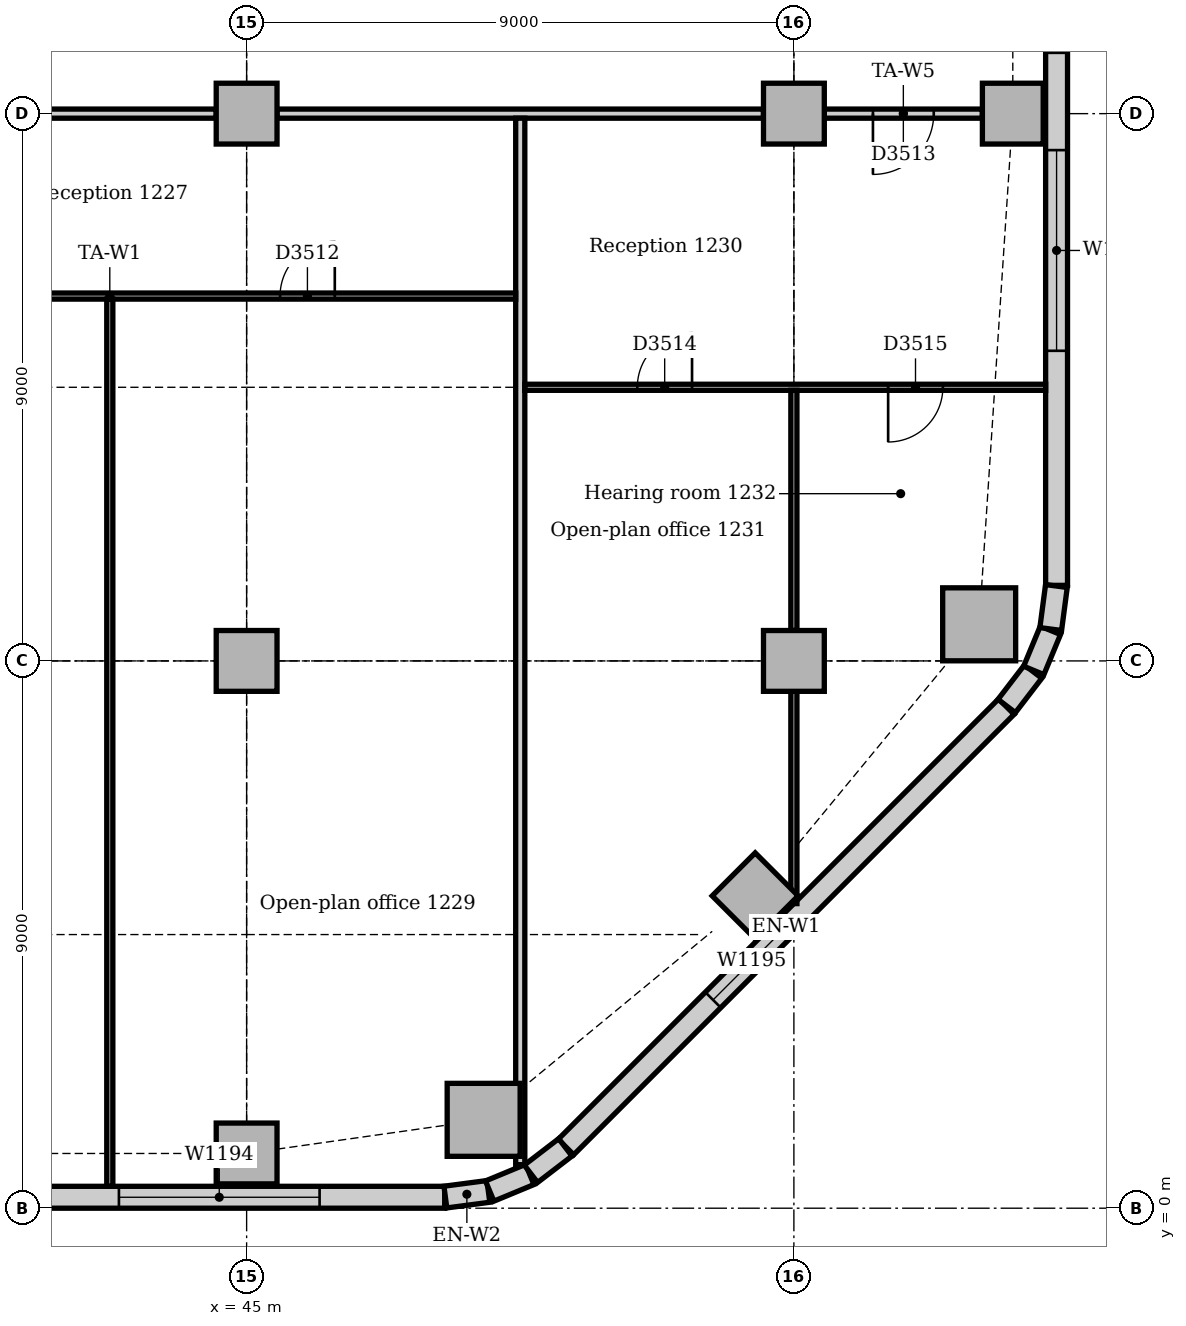
"""IFC4 building model, lengths in metres.
Left out: names, types, materials, properties, quantities, classifications, styles, units other than length and angle.
Written with IfcOpenShell. Run it as: python <this file> out.ifc"""

import sys

from ifc_helpers import new_model, si_unit, direction, frame, frame_2d, origin, origin_2d, place, context, subcontext, project, spatial, rectangle, extrude, element, fill, save


model = new_model("IFC4")
c1 = context("Model", 3, precision=1e-05, world=origin(), true_north=direction((0.0, 1.0)))
c2 = subcontext(c1, "Body", "Model", "MODEL_VIEW")
j1 = project(units=[si_unit("LENGTHUNIT", "METRE"), si_unit("PLANEANGLEUNIT", "RADIAN")], contexts=[c1])
p1 = place(None, origin())
s1 = spatial("IfcSite", under=j1, at=p1, CompositionType="ELEMENT")
p2 = place(p1, origin())
s2 = spatial("IfcBuilding", under=s1, at=p2, CompositionType="ELEMENT")
p3 = place(p2, frame((0.0, 0.0, 55.0)))
s3 = spatial("IfcBuildingStorey", under=s2, at=p3, CompositionType="ELEMENT", Elevation=55.0)
for number, where, z_axis, x_axis in (
    (1, (48.898, 1.453, 0.0), (0.0, 0.0, 1.0), (1.0, 0.0, 0.0)),
    (2, (57.047, 9.602, 0.0), (0.0, 0.0, 1.0), (1.0, 0.0, 0.0)),
):
    element("IfcColumn", number, at=place(p3, frame(where, z_axis=z_axis, x_axis=x_axis)), inside=s3, PredefinedType="COLUMN", context=c2, shape_type="SweptSolid", body=[
        extrude(rectangle(XDim=1.2, YDim=1.2, at=origin_2d()), origin(), (0.0, 0.0, 1.0), 3.85),
    ])
for number, where, z_axis, x_axis in (
    (3, (45.0, 0.9, 0.0), (0.0, 0.0, 1.0), (1.0, 0.0, 0.0)),
    (4, (53.364, 5.136, 0.0), (0.0, 0.0, 1.0), (0.707, 0.707, 0.0)),
    (5, (57.6, 18.0, 0.0), (0.0, 0.0, 1.0), (1.0, 0.0, 0.0)),
    (6, (45.0, 9.0, 0.0), (0.0, 0.0, 1.0), (1.0, 0.0, 0.0)),
    (7, (45.0, 18.0, 0.0), (0.0, 0.0, 1.0), (1.0, 0.0, 0.0)),
    (8, (54.0, 9.0, 0.0), (0.0, 0.0, 1.0), (1.0, 0.0, 0.0)),
    (9, (54.0, 18.0, 0.0), (0.0, 0.0, 1.0), (1.0, 0.0, 0.0)),
):
    element("IfcColumn", number, at=place(p3, frame(where, z_axis=z_axis, x_axis=x_axis)), inside=s3, PredefinedType="COLUMN", context=c2, shape_type="SweptSolid", body=[
        extrude(rectangle(XDim=1.0, YDim=1.0, at=origin_2d()), origin(), (0.0, 0.0, 1.0), 3.85),
    ])
p4 = place(p3, frame((4.243, 0.18, 0.0), z_axis=(0.0, 0.0, 1.0), x_axis=(1.0, 0.0, 0.0)))
e10 = element("IfcWall", 10, at=p4, inside=s3, PredefinedType="STANDARD", context=c2, shape_type="SweptSolid", body=[
    extrude(rectangle(XDim=44.015, YDim=0.36, at=frame_2d((22.007, 0.0))), origin(), (0.0, 0.0, 1.0), 3.85),
])
p5 = place(p4, frame((2.707, 0.0, 0.9)))
e11 = element("IfcOpeningElement", 11, at=p5, cuts=e10, PredefinedType="OPENING", context=c2, shape_type="SweptSolid", body=[
    extrude(rectangle(XDim=3.3, YDim=1.6, at=frame_2d((1.65, 0.8))), frame((0.0, 0.19, 0.0), z_axis=(0.0, -1.0, 0.0), x_axis=(1.0, 0.0, 0.0)), (0.0, 0.0, 1.0), 0.38),
])
p6 = place(p4, frame((7.257, 0.0, 0.9)))
e12 = element("IfcOpeningElement", 12, at=p6, cuts=e10, PredefinedType="OPENING", context=c2, shape_type="SweptSolid", body=[
    extrude(rectangle(XDim=1.8, YDim=1.6, at=frame_2d((0.9, 0.8))), frame((0.0, 0.19, 0.0), z_axis=(0.0, -1.0, 0.0), x_axis=(1.0, 0.0, 0.0)), (0.0, 0.0, 1.0), 0.38),
])
p7 = place(p4, frame((11.357, 0.0, 0.9)))
e13 = element("IfcOpeningElement", 13, at=p7, cuts=e10, PredefinedType="OPENING", context=c2, shape_type="SweptSolid", body=[
    extrude(rectangle(XDim=3.3, YDim=1.6, at=frame_2d((1.65, 0.8))), frame((0.0, 0.19, 0.0), z_axis=(0.0, -1.0, 0.0), x_axis=(1.0, 0.0, 0.0)), (0.0, 0.0, 1.0), 0.38),
])
p8 = place(p4, frame((15.857, 0.0, 0.9)))
e14 = element("IfcOpeningElement", 14, at=p8, cuts=e10, PredefinedType="OPENING", context=c2, shape_type="SweptSolid", body=[
    extrude(rectangle(XDim=3.3, YDim=1.6, at=frame_2d((1.65, 0.8))), frame((0.0, 0.19, 0.0), z_axis=(0.0, -1.0, 0.0), x_axis=(1.0, 0.0, 0.0)), (0.0, 0.0, 1.0), 0.38),
])
p9 = place(p4, frame((20.357, 0.0, 0.9)))
e15 = element("IfcOpeningElement", 15, at=p9, cuts=e10, PredefinedType="OPENING", context=c2, shape_type="SweptSolid", body=[
    extrude(rectangle(XDim=3.3, YDim=1.6, at=frame_2d((1.65, 0.8))), frame((0.0, 0.19, 0.0), z_axis=(0.0, -1.0, 0.0), x_axis=(1.0, 0.0, 0.0)), (0.0, 0.0, 1.0), 0.38),
])
p10 = place(p4, frame((25.307, 0.0, 0.9)))
e16 = element("IfcOpeningElement", 16, at=p10, cuts=e10, PredefinedType="OPENING", context=c2, shape_type="SweptSolid", body=[
    extrude(rectangle(XDim=1.8, YDim=1.6, at=frame_2d((0.9, 0.8))), frame((0.0, 0.19, 0.0), z_axis=(0.0, -1.0, 0.0), x_axis=(1.0, 0.0, 0.0)), (0.0, 0.0, 1.0), 0.38),
])
p11 = place(p4, frame((29.357, 0.0, 0.9)))
e17 = element("IfcOpeningElement", 17, at=p11, cuts=e10, PredefinedType="OPENING", context=c2, shape_type="SweptSolid", body=[
    extrude(rectangle(XDim=3.3, YDim=1.6, at=frame_2d((1.65, 0.8))), frame((0.0, 0.19, 0.0), z_axis=(0.0, -1.0, 0.0), x_axis=(1.0, 0.0, 0.0)), (0.0, 0.0, 1.0), 0.38),
])
p12 = place(p4, frame((33.857, 0.0, 0.9)))
e18 = element("IfcOpeningElement", 18, at=p12, cuts=e10, PredefinedType="OPENING", context=c2, shape_type="SweptSolid", body=[
    extrude(rectangle(XDim=3.3, YDim=1.6, at=frame_2d((1.65, 0.8))), frame((0.0, 0.19, 0.0), z_axis=(0.0, -1.0, 0.0), x_axis=(1.0, 0.0, 0.0)), (0.0, 0.0, 1.0), 0.38),
])
p13 = place(p4, frame((38.657, 0.0, 0.9)))
e19 = element("IfcOpeningElement", 19, at=p13, cuts=e10, PredefinedType="OPENING", context=c2, shape_type="SweptSolid", body=[
    extrude(rectangle(XDim=3.3, YDim=1.6, at=frame_2d((1.65, 0.8))), frame((0.0, 0.19, 0.0), z_axis=(0.0, -1.0, 0.0), x_axis=(1.0, 0.0, 0.0)), (0.0, 0.0, 1.0), 0.38),
])
p14 = place(p3, frame((50.251, 1.006, 0.0), z_axis=(0.0, 0.0, 1.0), x_axis=(0.707106781187, 0.707106781187, 0.0)))
e20 = element("IfcWall", 20, at=p14, inside=s3, PredefinedType="STANDARD", context=c2, shape_type="SweptSolid", body=[
    extrude(rectangle(XDim=10.243, YDim=0.36, at=frame_2d((5.121, 0.0))), origin(), (0.0, 0.0, 1.0), 3.85),
])
p15 = place(p14, frame((3.421, 0.0, 0.9)))
e21 = element("IfcOpeningElement", 21, at=p15, cuts=e20, PredefinedType="OPENING", context=c2, shape_type="SweptSolid", body=[
    extrude(rectangle(XDim=1.8, YDim=1.6, at=frame_2d((0.9, 0.8))), frame((0.0, 0.19, 0.0), z_axis=(0.0, -1.0, 0.0), x_axis=(1.0, 0.0, 0.0)), (0.0, 0.0, 1.0), 0.38),
])
p16 = place(p3, frame((58.32, 10.243, 0.0), z_axis=(0.0, 0.0, 1.0), x_axis=(0.0, 1.0, 0.0)))
e22 = element("IfcWall", 22, at=p16, inside=s3, PredefinedType="STANDARD", context=c2, shape_type="SweptSolid", body=[
    extrude(rectangle(XDim=24.515, YDim=0.36, at=frame_2d((12.257, 0.0))), origin(), (0.0, 0.0, 1.0), 3.85),
])
p17 = place(p16, frame((3.857, 0.0, 0.9)))
e23 = element("IfcOpeningElement", 23, at=p17, cuts=e22, PredefinedType="OPENING", context=c2, shape_type="SweptSolid", body=[
    extrude(rectangle(XDim=3.3, YDim=1.6, at=frame_2d((1.65, 0.8))), frame((0.0, 0.19, 0.0), z_axis=(0.0, -1.0, 0.0), x_axis=(1.0, 0.0, 0.0)), (0.0, 0.0, 1.0), 0.38),
])
p18 = place(p16, frame((8.757, 0.0, 0.9)))
e24 = element("IfcOpeningElement", 24, at=p18, cuts=e22, PredefinedType="OPENING", context=c2, shape_type="SweptSolid", body=[
    extrude(rectangle(XDim=1.8, YDim=1.6, at=frame_2d((0.9, 0.8))), frame((0.0, 0.19, 0.0), z_axis=(0.0, -1.0, 0.0), x_axis=(1.0, 0.0, 0.0)), (0.0, 0.0, 1.0), 0.38),
])
p19 = place(p16, frame((12.857, 0.0, 0.9)))
e25 = element("IfcOpeningElement", 25, at=p19, cuts=e22, PredefinedType="OPENING", context=c2, shape_type="SweptSolid", body=[
    extrude(rectangle(XDim=3.3, YDim=1.6, at=frame_2d((1.65, 0.8))), frame((0.0, 0.19, 0.0), z_axis=(0.0, -1.0, 0.0), x_axis=(1.0, 0.0, 0.0)), (0.0, 0.0, 1.0), 0.38),
])
p20 = place(p16, frame((17.357, 0.0, 0.9)))
e26 = element("IfcOpeningElement", 26, at=p20, cuts=e22, PredefinedType="OPENING", context=c2, shape_type="SweptSolid", body=[
    extrude(rectangle(XDim=3.3, YDim=1.6, at=frame_2d((1.65, 0.8))), frame((0.0, 0.19, 0.0), z_axis=(0.0, -1.0, 0.0), x_axis=(1.0, 0.0, 0.0)), (0.0, 0.0, 1.0), 0.38),
])
for number, where, z_axis, x_axis in (
    (27, (48.269, 0.183, 0.0), (0.0, 0.0, 1.0), (0.991, 0.131, 0.0)),
    (28, (48.997, 0.282, 0.0), (0.0, 0.0, 1.0), (0.924, 0.383, 0.0)),
):
    element("IfcWall", number, at=place(p3, frame(where, z_axis=z_axis, x_axis=x_axis)), inside=s3, PredefinedType="STANDARD", context=c2, shape_type="SweptSolid", body=[
        extrude(rectangle(XDim=0.713, YDim=0.36, at=frame_2d((0.356, 0.0))), origin(), (0.0, 0.0, 1.0), 3.85),
    ])
for number, where, z_axis, x_axis in (
    (29, (49.675, 0.566, 0.0), (0.0, 0.0, 1.0), (0.793, 0.609, 0.0)),
    (30, (57.5, 8.259, 0.0), (0.0, 0.0, 1.0), (0.609, 0.793, 0.0)),
):
    element("IfcWall", number, at=place(p3, frame(where, z_axis=z_axis, x_axis=x_axis)), inside=s3, PredefinedType="STANDARD", context=c2, shape_type="SweptSolid", body=[
        extrude(rectangle(XDim=0.713, YDim=0.36, at=frame_2d((0.357, 0.0))), origin(), (0.0, 0.0, 1.0), 3.85),
    ])
for number, where, z_axis, x_axis in (
    (31, (57.945, 8.844, 0.0), (0.0, 0.0, 1.0), (0.383, 0.924, 0.0)),
    (32, (58.224, 9.524, 0.0), (0.0, 0.0, 1.0), (0.131, 0.991, 0.0)),
):
    element("IfcWall", number, at=place(p3, frame(where, z_axis=z_axis, x_axis=x_axis)), inside=s3, PredefinedType="STANDARD", context=c2, shape_type="SweptSolid", body=[
        extrude(rectangle(XDim=0.713, YDim=0.36, at=frame_2d((0.356, 0.0))), origin(), (0.0, 0.0, 1.0), 3.85),
    ])
p21 = place(p3, frame((54.5, 18.0, 0.0), z_axis=(0.0, 0.0, 1.0), x_axis=(1.0, 0.0, 0.0)))
e33 = element("IfcWall", 33, at=p21, inside=s3, PredefinedType="PARTITIONING", context=c2, shape_type="SweptSolid", body=[
    extrude(rectangle(XDim=2.6, YDim=0.15, at=frame_2d((1.3, 0.0))), origin(), (0.0, 0.0, 1.0), 3.602),
])
p22 = place(p21, frame((0.8, 0.0, 0.0)))
e34 = element("IfcOpeningElement", 34, at=p22, cuts=e33, PredefinedType="OPENING", context=c2, shape_type="SweptSolid", body=[
    extrude(rectangle(XDim=1.0, YDim=2.1, at=frame_2d((0.5, 1.05))), frame((0.0, 0.085, 0.0), z_axis=(0.0, -1.0, 0.0), x_axis=(1.0, 0.0, 0.0)), (0.0, 0.0, 1.0), 0.17),
])
p23 = place(p3, frame((45.5, 18.0, 0.0), z_axis=(0.0, 0.0, 1.0), x_axis=(1.0, 0.0, 0.0)))
e35 = element("IfcWall", 35, at=p23, inside=s3, PredefinedType="PARTITIONING", context=c2, shape_type="SweptSolid", body=[
    extrude(rectangle(XDim=8.0, YDim=0.15, at=frame_2d((4.0, 0.0))), origin(), (0.0, 0.0, 1.0), 3.15),
])
p24 = place(p3, frame((36.5, 18.0, 0.0), z_axis=(0.0, 0.0, 1.0), x_axis=(1.0, 0.0, 0.0)))
e36 = element("IfcWall", 36, at=p24, inside=s3, PredefinedType="PARTITIONING", context=c2, shape_type="SweptSolid", body=[
    extrude(rectangle(XDim=8.0, YDim=0.15, at=frame_2d((4.0, 0.0))), origin(), (0.0, 0.0, 1.0), 3.15),
])
p25 = place(p24, frame((3.5, 0.0, 0.0)))
e37 = element("IfcOpeningElement", 37, at=p25, cuts=e36, PredefinedType="OPENING", context=c2, shape_type="SweptSolid", body=[
    extrude(rectangle(XDim=1.0, YDim=2.1, at=frame_2d((0.5, 1.05))), frame((0.0, 0.085, 0.0), z_axis=(0.0, -1.0, 0.0), x_axis=(1.0, 0.0, 0.0)), (0.0, 0.0, 1.0), 0.17),
])
p26 = place(p3, frame((49.5, 0.716, 0.0), z_axis=(0.0, 0.0, 1.0), x_axis=(0.0, 1.0, 0.0)))
e38 = element("IfcWall", 38, at=p26, inside=s3, PredefinedType="PARTITIONING", context=c2, shape_type="SweptSolid", body=[
    extrude(rectangle(XDim=17.209, YDim=0.15, at=frame_2d((8.604, 0.0))), origin(), (0.0, 0.0, 1.0), 3.85),
])
p27 = place(p3, frame((36.075, 15.0, 0.0), z_axis=(0.0, 0.0, 1.0), x_axis=(1.0, 0.0, 0.0)))
e39 = element("IfcWall", 39, at=p27, inside=s3, PredefinedType="PARTITIONING", context=c2, shape_type="SweptSolid", body=[
    extrude(rectangle(XDim=13.35, YDim=0.1, at=frame_2d((6.675, 0.0))), origin(), (0.0, 0.0, 1.0), 3.85),
])
p28 = place(p27, frame((2.95, 0.0, 0.0)))
e40 = element("IfcOpeningElement", 40, at=p28, cuts=e39, PredefinedType="OPENING", context=c2, shape_type="SweptSolid", body=[
    extrude(rectangle(XDim=0.9, YDim=2.1, at=frame_2d((0.45, 1.05))), frame((0.0, 0.06, 0.0), z_axis=(0.0, -1.0, 0.0), x_axis=(1.0, 0.0, 0.0)), (0.0, 0.0, 1.0), 0.12),
])
p29 = place(p27, frame((9.475, 0.0, 0.0)))
e41 = element("IfcOpeningElement", 41, at=p29, cuts=e39, PredefinedType="OPENING", context=c2, shape_type="SweptSolid", body=[
    extrude(rectangle(XDim=0.9, YDim=2.1, at=frame_2d((0.45, 1.05))), frame((0.0, 0.06, 0.0), z_axis=(0.0, -1.0, 0.0), x_axis=(1.0, 0.0, 0.0)), (0.0, 0.0, 1.0), 0.12),
])
p30 = place(p3, frame((42.75, 0.36, 0.0), z_axis=(0.0, 0.0, 1.0), x_axis=(0.0, 1.0, 0.0)))
e42 = element("IfcWall", 42, at=p30, inside=s3, PredefinedType="PARTITIONING", context=c2, shape_type="SweptSolid", body=[
    extrude(rectangle(XDim=14.59, YDim=0.1, at=frame_2d((7.295, 0.0))), origin(), (0.0, 0.0, 1.0), 3.85),
])
p31 = place(p3, frame((49.575, 13.5, 0.0), z_axis=(0.0, 0.0, 1.0), x_axis=(1.0, 0.0, 0.0)))
e43 = element("IfcWall", 43, at=p31, inside=s3, PredefinedType="PARTITIONING", context=c2, shape_type="SweptSolid", body=[
    extrude(rectangle(XDim=8.565, YDim=0.1, at=frame_2d((4.282, 0.0))), origin(), (0.0, 0.0, 1.0), 3.35),
])
p32 = place(p31, frame((1.85, 0.0, 0.0)))
e44 = element("IfcOpeningElement", 44, at=p32, cuts=e43, PredefinedType="OPENING", context=c2, shape_type="SweptSolid", body=[
    extrude(rectangle(XDim=0.9, YDim=2.1, at=frame_2d((0.45, 1.05))), frame((0.0, 0.06, 0.0), z_axis=(0.0, -1.0, 0.0), x_axis=(1.0, 0.0, 0.0)), (0.0, 0.0, 1.0), 0.12),
])
p33 = place(p31, frame((5.975, 0.0, 0.0)))
e45 = element("IfcOpeningElement", 45, at=p33, cuts=e43, PredefinedType="OPENING", context=c2, shape_type="SweptSolid", body=[
    extrude(rectangle(XDim=0.9, YDim=2.1, at=frame_2d((0.45, 1.05))), frame((0.0, 0.06, 0.0), z_axis=(0.0, -1.0, 0.0), x_axis=(1.0, 0.0, 0.0)), (0.0, 0.0, 1.0), 0.12),
])
p34 = place(p3, frame((54.0, 5.009, 0.0), z_axis=(0.0, 0.0, 1.0), x_axis=(0.0, 1.0, 0.0)))
e46 = element("IfcWall", 46, at=p34, inside=s3, PredefinedType="PARTITIONING", context=c2, shape_type="SweptSolid", body=[
    extrude(rectangle(XDim=3.491, YDim=0.1, at=frame_2d((1.745, 0.0))), origin(), (0.0, 0.0, 1.0), 3.652),
])
p35 = place(p3, frame((54.0, 9.5, 0.0), z_axis=(0.0, 0.0, 1.0), x_axis=(0.0, 1.0, 0.0)))
e47 = element("IfcWall", 47, at=p35, inside=s3, PredefinedType="PARTITIONING", context=c2, shape_type="SweptSolid", body=[
    extrude(rectangle(XDim=3.95, YDim=0.1, at=frame_2d((1.975, 0.0))), origin(), (0.0, 0.0, 1.0), 3.158),
])
p36 = place(p13, origin())
e48 = element("IfcWindow", 48, at=p36, inside=s3, PartitioningType="SINGLE_PANEL", PredefinedType="WINDOW", context=c2, shape_type="SweptSolid", body=[
    extrude(rectangle(XDim=3.3, YDim=1.6, at=frame_2d((1.65, 0.8))), frame((0.0, 0.13, 0.0), z_axis=(0.0, -1.0, 0.0), x_axis=(1.0, 0.0, 0.0)), (0.0, 0.0, 1.0), 0.06),
])
fill(e19, e48)
p37 = place(p15, origin())
e49 = element("IfcWindow", 49, at=p37, inside=s3, PartitioningType="SINGLE_PANEL", PredefinedType="WINDOW", context=c2, shape_type="SweptSolid", body=[
    extrude(rectangle(XDim=1.8, YDim=1.6, at=frame_2d((0.9, 0.8))), frame((0.0, 0.13, 0.0), z_axis=(0.0, -1.0, 0.0), x_axis=(1.0, 0.0, 0.0)), (0.0, 0.0, 1.0), 0.06),
])
fill(e21, e49)
p38 = place(p17, origin())
e50 = element("IfcWindow", 50, at=p38, inside=s3, PartitioningType="SINGLE_PANEL", PredefinedType="WINDOW", context=c2, shape_type="SweptSolid", body=[
    extrude(rectangle(XDim=3.3, YDim=1.6, at=frame_2d((1.65, 0.8))), frame((0.0, 0.13, 0.0), z_axis=(0.0, -1.0, 0.0), x_axis=(1.0, 0.0, 0.0)), (0.0, 0.0, 1.0), 0.06),
])
fill(e23, e50)
p39 = place(p29, origin())
e51 = element("IfcDoor", 51, at=p39, inside=s3, OperationType="SINGLE_SWING_RIGHT", PredefinedType="DOOR", context=c2, shape_type="SweptSolid", body=[
    extrude(rectangle(XDim=0.9, YDim=2.1, at=frame_2d((0.45, 1.05))), frame((0.0, 0.025, 0.0), z_axis=(0.0, -1.0, 0.0), x_axis=(1.0, 0.0, 0.0)), (0.0, 0.0, 1.0), 0.05),
])
fill(e41, e51)
p40 = place(p22, frame((1.0, 0.0, 0.0), z_axis=(0.0, 0.0, 1.0), x_axis=(-1.0, 0.0, 0.0)))
e52 = element("IfcDoor", 52, at=p40, inside=s3, OperationType="SINGLE_SWING_RIGHT", PredefinedType="DOOR", context=c2, shape_type="SweptSolid", body=[
    extrude(rectangle(XDim=1.0, YDim=2.1, at=frame_2d((0.5, 1.05))), frame((0.0, 0.025, 0.0), z_axis=(0.0, -1.0, 0.0), x_axis=(1.0, 0.0, 0.0)), (0.0, 0.0, 1.0), 0.05),
])
fill(e34, e52)
p41 = place(p32, origin())
e53 = element("IfcDoor", 53, at=p41, inside=s3, OperationType="SINGLE_SWING_RIGHT", PredefinedType="DOOR", context=c2, shape_type="SweptSolid", body=[
    extrude(rectangle(XDim=0.9, YDim=2.1, at=frame_2d((0.45, 1.05))), frame((0.0, 0.025, 0.0), z_axis=(0.0, -1.0, 0.0), x_axis=(1.0, 0.0, 0.0)), (0.0, 0.0, 1.0), 0.05),
])
fill(e44, e53)
p42 = place(p33, frame((0.9, 0.0, 0.0), z_axis=(0.0, 0.0, 1.0), x_axis=(-1.0, 0.0, 0.0)))
e54 = element("IfcDoor", 54, at=p42, inside=s3, OperationType="SINGLE_SWING_RIGHT", PredefinedType="DOOR", context=c2, shape_type="SweptSolid", body=[
    extrude(rectangle(XDim=0.9, YDim=2.1, at=frame_2d((0.45, 1.05))), frame((0.0, 0.025, 0.0), z_axis=(0.0, -1.0, 0.0), x_axis=(1.0, 0.0, 0.0)), (0.0, 0.0, 1.0), 0.05),
])
fill(e45, e54)
save(model, sys.argv[1])
